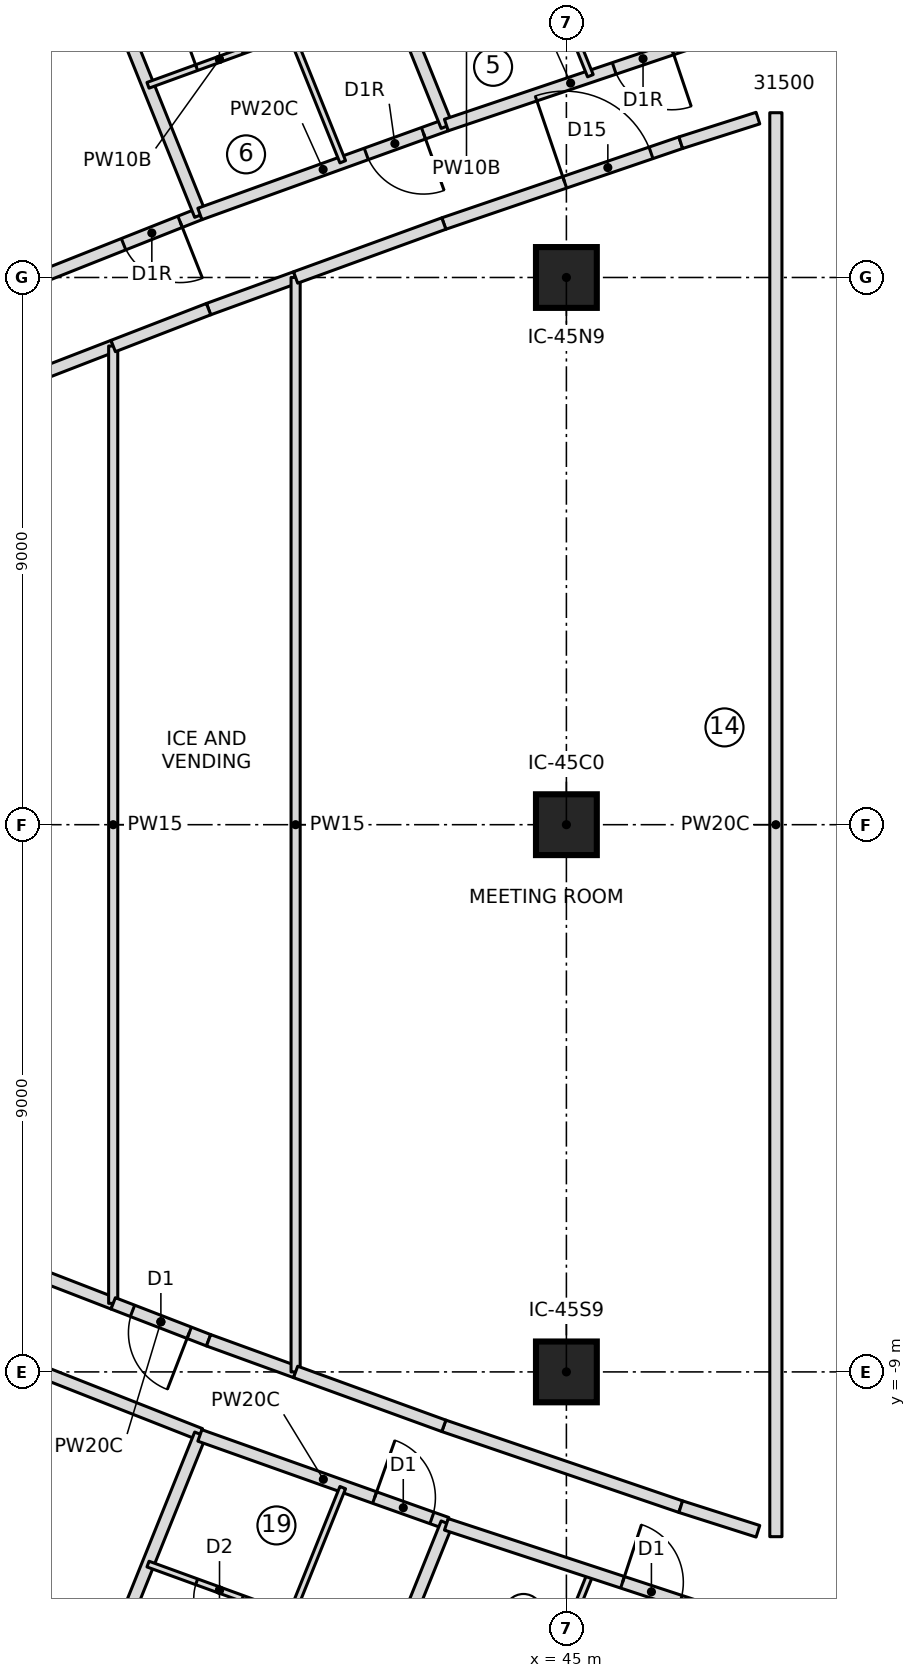
"""IFC4 building model, lengths in metres.
Left out: names, types, materials, properties, quantities, classifications, styles, units other than length and angle.
Written with IfcOpenShell. Run it as: python <this file> out.ifc"""

import sys

from ifc_helpers import new_model, si_unit, direction, frame, frame_2d, origin, origin_2d, place, context, subcontext, project, spatial, rectangle, extrude, element, fill, save


model = new_model("IFC4")
c1 = context("Model", 3, precision=1e-05, world=origin(), true_north=direction((0.0, 1.0)))
c2 = subcontext(c1, "Body", "Model", "MODEL_VIEW")
j1 = project(units=[si_unit("LENGTHUNIT", "METRE"), si_unit("PLANEANGLEUNIT", "RADIAN")], contexts=[c1])
p1 = place(None, origin())
s1 = spatial("IfcSite", under=j1, at=p1, CompositionType="ELEMENT")
p2 = place(p1, origin())
s2 = spatial("IfcBuilding", under=s1, at=p2, CompositionType="ELEMENT")
p3 = place(p2, frame((0.0, 0.0, 179.05)))
s3 = spatial("IfcBuildingStorey", under=s2, at=p3, CompositionType="ELEMENT", Elevation=179.05)
for number, where, z_axis, x_axis in (
    (1, (45.0, -9.0, 0.0), (0.0, 0.0, 1.0), (1.0, 0.0, 0.0)),
    (2, (45.0, 0.0, 0.0), (0.0, 0.0, 1.0), (1.0, 0.0, 0.0)),
    (3, (45.0, 9.0, 0.0), (0.0, 0.0, 1.0), (1.0, 0.0, 0.0)),
):
    element("IfcColumn", number, at=place(p3, frame(where, z_axis=z_axis, x_axis=x_axis)), inside=s3, PredefinedType="COLUMN", context=c2, shape_type="SweptSolid", body=[
        extrude(rectangle(XDim=1.0, YDim=1.0, at=origin_2d()), origin(), (0.0, 0.0, 1.0), 3.55),
    ])
p4 = place(p3, frame((38.972, 10.045, 0.0), z_axis=(0.0, 0.0, 1.0), x_axis=(-0.929554647243, -0.368684360651, 0.0)))
e4 = element("IfcWall", 4, at=p4, inside=s3, PredefinedType="PARTITIONING", context=c2, shape_type="SweptSolid", body=[
    extrude(rectangle(XDim=8.622, YDim=0.2, at=frame_2d((4.311, 0.0))), origin(), (0.0, 0.0, 1.0), 3.25),
])
p5 = place(p4, frame((0.35, 0.0, 0.0)))
e5 = element("IfcOpeningElement", 5, at=p5, cuts=e4, PredefinedType="OPENING", context=c2, shape_type="SweptSolid", body=[
    extrude(rectangle(XDim=1.0, YDim=2.1, at=frame_2d((0.5, 1.05))), frame((0.0, 0.11, 0.0), z_axis=(0.0, -1.0, 0.0), x_axis=(1.0, 0.0, 0.0)), (0.0, 0.0, 1.0), 0.22),
])
p6 = place(p3, frame((38.98, 10.026, 0.0), z_axis=(0.0, 0.0, 1.0), x_axis=(-0.373863662938, 0.927483671843, 0.0)))
e6 = element("IfcWall", 6, at=p6, inside=s3, PredefinedType="PARTITIONING", context=c2, shape_type="SweptSolid", body=[
    extrude(rectangle(XDim=7.604, YDim=0.2, at=frame_2d((3.802, 0.0))), origin(), (0.0, 0.0, 1.0), 3.25),
])
p7 = place(p3, frame((43.026, 11.507, 0.0), z_axis=(0.0, 0.0, 1.0), x_axis=(-0.940653905433, -0.339367397069, 0.0)))
e7 = element("IfcWall", 7, at=p7, inside=s3, PredefinedType="PARTITIONING", context=c2, shape_type="SweptSolid", body=[
    extrude(rectangle(XDim=4.309, YDim=0.2, at=frame_2d((2.155, 0.0))), origin(), (0.0, 0.0, 1.0), 3.25),
])
p8 = place(p7, frame((0.4, 0.0, 0.0)))
e8 = element("IfcOpeningElement", 8, at=p8, cuts=e7, PredefinedType="OPENING", context=c2, shape_type="SweptSolid", body=[
    extrude(rectangle(XDim=1.0, YDim=2.1, at=frame_2d((0.5, 1.05))), frame((0.0, 0.11, 0.0), z_axis=(0.0, -1.0, 0.0), x_axis=(1.0, 0.0, 0.0)), (0.0, 0.0, 1.0), 0.22),
])
p9 = place(p3, frame((38.119, 12.161, 0.0), z_axis=(0.0, 0.0, 1.0), x_axis=(0.939744972593, 0.341876273652, 0.0)))
e9 = element("IfcWall", 9, at=p9, inside=s3, PredefinedType="PARTITIONING", context=c2, shape_type="SweptSolid", body=[
    extrude(rectangle(XDim=2.501, YDim=0.1, at=frame_2d((1.251, 0.0))), origin(), (0.0, 0.0, 1.0), 3.25),
])
p10 = place(p9, frame((0.85, 0.0, 0.0)))
e10 = element("IfcOpeningElement", 10, at=p10, cuts=e9, PredefinedType="OPENING", context=c2, shape_type="SweptSolid", body=[
    extrude(rectangle(XDim=0.8, YDim=2.1, at=frame_2d((0.4, 1.05))), frame((0.0, 0.06, 0.0), z_axis=(0.0, -1.0, 0.0), x_axis=(1.0, 0.0, 0.0)), (0.0, 0.0, 1.0), 0.12),
])
p11 = place(p3, frame((40.47, 13.016, 0.0), z_axis=(0.0, 0.0, 1.0), x_axis=(0.373846436826, -0.927490615409, 0.0)))
e11 = element("IfcWall", 11, at=p11, inside=s3, PredefinedType="PARTITIONING", context=c2, shape_type="SweptSolid", body=[
    extrude(rectangle(XDim=2.279, YDim=0.1, at=frame_2d((1.139, 0.0))), origin(), (0.0, 0.0, 1.0), 3.25),
])
p12 = place(p3, frame((43.033, 11.489, 0.0), z_axis=(0.0, 0.0, 1.0), x_axis=(-0.373877998371, 0.927477893178, 0.0)))
e12 = element("IfcWall", 12, at=p12, inside=s3, PredefinedType="PARTITIONING", context=c2, shape_type="SweptSolid", body=[
    extrude(rectangle(XDim=7.611, YDim=0.2, at=frame_2d((3.806, 0.0))), origin(), (0.0, 0.0, 1.0), 3.25),
])
p13 = place(p3, frame((47.113, 12.886, 0.0), z_axis=(0.0, 0.0, 1.0), x_axis=(-0.947550995841, -0.319604615549, 0.0)))
e13 = element("IfcWall", 13, at=p13, inside=s3, PredefinedType="PARTITIONING", context=c2, shape_type="SweptSolid", body=[
    extrude(rectangle(XDim=4.314, YDim=0.2, at=frame_2d((2.157, 0.0))), origin(), (0.0, 0.0, 1.0), 3.25),
])
p14 = place(p13, frame((0.4, 0.0, 0.0)))
e14 = element("IfcOpeningElement", 14, at=p14, cuts=e13, PredefinedType="OPENING", context=c2, shape_type="SweptSolid", body=[
    extrude(rectangle(XDim=1.0, YDim=2.1, at=frame_2d((0.5, 1.05))), frame((0.0, 0.11, 0.0), z_axis=(0.0, -1.0, 0.0), x_axis=(1.0, 0.0, 0.0)), (0.0, 0.0, 1.0), 0.22),
])
p15 = place(p3, frame((44.542, 14.434, 0.0), z_axis=(0.0, 0.0, 1.0), x_axis=(0.373917841166, -0.927461831052, 0.0)))
e15 = element("IfcWall", 15, at=p15, inside=s3, PredefinedType="PARTITIONING", context=c2, shape_type="SweptSolid", body=[
    extrude(rectangle(XDim=2.281, YDim=0.1, at=frame_2d((1.14, 0.0))), origin(), (0.0, 0.0, 1.0), 3.25),
])
p16 = place(p3, frame((30.958, -6.866, 0.0), z_axis=(0.0, 0.0, 1.0), x_axis=(0.93040517394, -0.366532689274, 0.0)))
e16 = element("IfcWall", 16, at=p16, inside=s3, PredefinedType="PARTITIONING", context=c2, shape_type="SweptSolid", body=[
    extrude(rectangle(XDim=8.622, YDim=0.2, at=frame_2d((4.311, 0.0))), origin(), (0.0, 0.0, 1.0), 3.25),
])
p17 = place(p16, frame((4.25, 0.0, 0.0)))
e17 = element("IfcOpeningElement", 17, at=p17, cuts=e16, PredefinedType="OPENING", context=c2, shape_type="SweptSolid", body=[
    extrude(rectangle(XDim=1.0, YDim=2.1, at=frame_2d((0.5, 1.05))), frame((0.0, 0.11, 0.0), z_axis=(0.0, -1.0, 0.0), x_axis=(1.0, 0.0, 0.0)), (0.0, 0.0, 1.0), 0.22),
])
p18 = place(p3, frame((36.137, -17.079, 0.0), z_axis=(0.0, 0.0, 1.0), x_axis=(0.373863662938, 0.927483671843, 0.0)))
e18 = element("IfcWall", 18, at=p18, inside=s3, PredefinedType="PARTITIONING", context=c2, shape_type="SweptSolid", body=[
    extrude(rectangle(XDim=7.604, YDim=0.2, at=frame_2d((3.802, 0.0))), origin(), (0.0, 0.0, 1.0), 3.25),
])
p19 = place(p3, frame((38.972, -10.045, 0.0), z_axis=(0.0, 0.0, 1.0), x_axis=(0.942220252757, -0.334994022773, 0.0)))
e19 = element("IfcWall", 19, at=p19, inside=s3, PredefinedType="PARTITIONING", context=c2, shape_type="SweptSolid", body=[
    extrude(rectangle(XDim=4.31, YDim=0.2, at=frame_2d((2.155, 0.0))), origin(), (0.0, 0.0, 1.0), 3.25),
])
p20 = place(p19, frame((3.05, 0.0, 0.0)))
e20 = element("IfcOpeningElement", 20, at=p20, cuts=e19, PredefinedType="OPENING", context=c2, shape_type="SweptSolid", body=[
    extrude(rectangle(XDim=1.0, YDim=2.1, at=frame_2d((0.5, 1.05))), frame((0.0, 0.11, 0.0), z_axis=(0.0, -1.0, 0.0), x_axis=(1.0, 0.0, 0.0)), (0.0, 0.0, 1.0), 0.22),
])
p21 = place(p3, frame((41.322, -10.903, 0.0), z_axis=(0.0, 0.0, 1.0), x_axis=(-0.373846436826, -0.927490615409, 0.0)))
e21 = element("IfcWall", 21, at=p21, inside=s3, PredefinedType="PARTITIONING", context=c2, shape_type="SweptSolid", body=[
    extrude(rectangle(XDim=2.279, YDim=0.1, at=frame_2d((1.139, 0.0))), origin(), (0.0, 0.0, 1.0), 3.25),
])
p22 = place(p3, frame((40.47, -13.016, 0.0), z_axis=(0.0, 0.0, 1.0), x_axis=(-0.939744972593, 0.341876273652, 0.0)))
e22 = element("IfcWall", 22, at=p22, inside=s3, PredefinedType="PARTITIONING", context=c2, shape_type="SweptSolid", body=[
    extrude(rectangle(XDim=2.501, YDim=0.1, at=frame_2d((1.251, 0.0))), origin(), (0.0, 0.0, 1.0), 3.25),
])
p23 = place(p22, frame((0.85, 0.0, 0.0)))
e23 = element("IfcOpeningElement", 23, at=p23, cuts=e22, PredefinedType="OPENING", context=c2, shape_type="SweptSolid", body=[
    extrude(rectangle(XDim=0.8, YDim=2.1, at=frame_2d((0.4, 1.05))), frame((0.0, 0.06, 0.0), z_axis=(0.0, -1.0, 0.0), x_axis=(1.0, 0.0, 0.0)), (0.0, 0.0, 1.0), 0.12),
])
p24 = place(p3, frame((40.188, -18.548, 0.0), z_axis=(0.0, 0.0, 1.0), x_axis=(0.373877998371, 0.927477893178, 0.0)))
e24 = element("IfcWall", 24, at=p24, inside=s3, PredefinedType="PARTITIONING", context=c2, shape_type="SweptSolid", body=[
    extrude(rectangle(XDim=7.611, YDim=0.2, at=frame_2d((3.806, 0.0))), origin(), (0.0, 0.0, 1.0), 3.25),
])
p25 = place(p3, frame((45.395, -12.318, 0.0), z_axis=(0.0, 0.0, 1.0), x_axis=(-0.373917841166, -0.927461831052, 0.0)))
e25 = element("IfcWall", 25, at=p25, inside=s3, PredefinedType="PARTITIONING", context=c2, shape_type="SweptSolid", body=[
    extrude(rectangle(XDim=2.281, YDim=0.1, at=frame_2d((1.14, 0.0))), origin(), (0.0, 0.0, 1.0), 3.25),
])
for number, where, z_axis, x_axis in (
    (26, (35.276, 6.994, 0.0), (0.0, 0.0, 1.0), (0.933, 0.361, 0.0)),
    (27, (37.547, -7.873, 0.0), (0.0, 0.0, 1.0), (-0.933, 0.361, 0.0)),
):
    element("IfcWall", number, at=place(p3, frame(where, z_axis=z_axis, x_axis=x_axis)), inside=s3, PredefinedType="PARTITIONING", context=c2, shape_type="SweptSolid", body=[
        extrude(rectangle(XDim=2.435, YDim=0.2, at=frame_2d((1.218, 0.0))), origin(), (0.0, 0.0, 1.0), 3.25),
    ])
p26 = place(p3, frame((37.547, -7.873, 0.0), z_axis=(0.0, 0.0, 1.0), x_axis=(0.0, 1.0, 0.0)))
e28 = element("IfcWall", 28, at=p26, inside=s3, PredefinedType="PARTITIONING", context=c2, shape_type="SweptSolid", body=[
    extrude(rectangle(XDim=15.746, YDim=0.15, at=frame_2d((7.873, 0.0))), origin(), (0.0, 0.0, 1.0), 3.25),
])
p27 = place(p3, frame((39.115, -8.479, 0.0), z_axis=(0.0, 0.0, 1.0), x_axis=(-0.932670528514, 0.360729379511, 0.0)))
e29 = element("IfcWall", 29, at=p27, inside=s3, PredefinedType="PARTITIONING", context=c2, shape_type="SweptSolid", body=[
    extrude(rectangle(XDim=1.682, YDim=0.2, at=frame_2d((0.841, 0.0))), origin(), (0.0, 0.0, 1.0), 3.25),
])
p28 = place(p27, frame((0.341, 0.0, 0.0)))
e30 = element("IfcOpeningElement", 30, at=p28, cuts=e29, PredefinedType="OPENING", context=c2, shape_type="SweptSolid", body=[
    extrude(rectangle(XDim=1.0, YDim=2.1, at=frame_2d((0.5, 1.05))), frame((0.0, 0.11, 0.0), z_axis=(0.0, -1.0, 0.0), x_axis=(1.0, 0.0, 0.0)), (0.0, 0.0, 1.0), 0.22),
])
for number, where, z_axis, x_axis in (
    (31, (39.115, 8.479, 0.0), (0.0, 0.0, 1.0), (0.94, 0.342, 0.0)),
    (32, (40.547, -9.0, 0.0), (0.0, 0.0, 1.0), (-0.94, 0.342, 0.0)),
):
    element("IfcWall", number, at=place(p3, frame(where, z_axis=z_axis, x_axis=x_axis)), inside=s3, PredefinedType="PARTITIONING", context=c2, shape_type="SweptSolid", body=[
        extrude(rectangle(XDim=1.523, YDim=0.2, at=frame_2d((0.762, 0.0))), origin(), (0.0, 0.0, 1.0), 3.25),
    ])
p29 = place(p3, frame((37.547, 7.873, 0.0), z_axis=(0.0, 0.0, 1.0), x_axis=(0.932670528514, 0.360729379511, 0.0)))
e33 = element("IfcWall", 33, at=p29, inside=s3, PredefinedType="PARTITIONING", context=c2, shape_type="SweptSolid", body=[
    extrude(rectangle(XDim=1.682, YDim=0.2, at=frame_2d((0.841, 0.0))), origin(), (0.0, 0.0, 1.0), 3.25),
])
p30 = place(p3, frame((40.547, -9.0, 0.0), z_axis=(0.0, 0.0, 1.0), x_axis=(0.0, 1.0, 0.0)))
e34 = element("IfcWall", 34, at=p30, inside=s3, PredefinedType="PARTITIONING", context=c2, shape_type="SweptSolid", body=[
    extrude(rectangle(XDim=18.0, YDim=0.15, at=frame_2d((9.0, 0.0))), origin(), (0.0, 0.0, 1.0), 3.25),
])
p31 = place(p3, frame((42.984, 9.887, 0.0), z_axis=(0.0, 0.0, 1.0), x_axis=(0.946436071896, 0.322891253852, 0.0)))
e35 = element("IfcWall", 35, at=p31, inside=s3, PredefinedType="PARTITIONING", context=c2, shape_type="SweptSolid", body=[
    extrude(rectangle(XDim=4.117, YDim=0.2, at=frame_2d((2.059, 0.0))), origin(), (0.0, 0.0, 1.0), 3.25),
])
p32 = place(p31, frame((2.1, 0.0, 0.0)))
e36 = element("IfcOpeningElement", 36, at=p32, cuts=e35, PredefinedType="OPENING", context=c2, shape_type="SweptSolid", body=[
    extrude(rectangle(XDim=1.5, YDim=2.1, at=frame_2d((0.75, 1.05))), frame((0.0, 0.11, 0.0), z_axis=(0.0, -1.0, 0.0), x_axis=(1.0, 0.0, 0.0)), (0.0, 0.0, 1.0), 0.22),
])
p33 = place(p3, frame((46.881, -11.217, 0.0), z_axis=(0.0, 0.0, 1.0), x_axis=(-0.946436071896, 0.322891253852, 0.0)))
e37 = element("IfcWall", 37, at=p33, inside=s3, PredefinedType="PARTITIONING", context=c2, shape_type="SweptSolid", body=[
    extrude(rectangle(XDim=4.117, YDim=0.2, at=frame_2d((2.059, 0.0))), origin(), (0.0, 0.0, 1.0), 3.25),
])
for number, where, z_axis, x_axis in (
    (38, (42.984, -9.887, 0.0), (0.0, 0.0, 1.0), (-0.94, 0.342, 0.0)),
    (39, (40.547, 9.0, 0.0), (0.0, 0.0, 1.0), (0.94, 0.342, 0.0)),
):
    element("IfcWall", number, at=place(p3, frame(where, z_axis=z_axis, x_axis=x_axis)), inside=s3, PredefinedType="PARTITIONING", context=c2, shape_type="SweptSolid", body=[
        extrude(rectangle(XDim=2.594, YDim=0.2, at=frame_2d((1.297, 0.0))), origin(), (0.0, 0.0, 1.0), 3.25),
    ])
p34 = place(p3, frame((43.026, -11.507, 0.0), z_axis=(0.0, 0.0, 1.0), x_axis=(0.949951949432, -0.312396052744, 0.0)))
e40 = element("IfcWall", 40, at=p34, inside=s3, PredefinedType="PARTITIONING", context=c2, shape_type="SweptSolid", body=[
    extrude(rectangle(XDim=5.394, YDim=0.2, at=frame_2d((2.697, 0.0))), origin(), (0.0, 0.0, 1.0), 3.25),
])
p35 = place(p34, frame((3.05, 0.0, 0.0)))
e41 = element("IfcOpeningElement", 41, at=p35, cuts=e40, PredefinedType="OPENING", context=c2, shape_type="SweptSolid", body=[
    extrude(rectangle(XDim=1.0, YDim=2.1, at=frame_2d((0.5, 1.05))), frame((0.0, 0.11, 0.0), z_axis=(0.0, -1.0, 0.0), x_axis=(1.0, 0.0, 0.0)), (0.0, 0.0, 1.0), 0.22),
])
for number, where, z_axis, x_axis in (
    (42, (46.881, 11.217, 0.0), (0.0, 0.0, 1.0), (0.953, 0.304, 0.0)),
    (43, (48.15, -11.621, 0.0), (0.0, 0.0, 1.0), (-0.953, 0.304, 0.0)),
):
    element("IfcWall", number, at=place(p3, frame(where, z_axis=z_axis, x_axis=x_axis)), inside=s3, PredefinedType="PARTITIONING", context=c2, shape_type="SweptSolid", body=[
        extrude(rectangle(XDim=1.332, YDim=0.2, at=frame_2d((0.666, 0.0))), origin(), (0.0, 0.0, 1.0), 3.25),
    ])
p36 = place(p3, frame((48.445, 11.71, 0.0), z_axis=(0.0, 0.0, 1.0), x_axis=(0.0, -1.0, 0.0)))
e44 = element("IfcWall", 44, at=p36, inside=s3, PredefinedType="PARTITIONING", context=c2, shape_type="SweptSolid", body=[
    extrude(rectangle(XDim=23.42, YDim=0.2, at=frame_2d((11.71, 0.0))), origin(), (0.0, 0.0, 1.0), 3.25),
])
p37 = place(p5, origin())
e45 = element("IfcDoor", 45, at=p37, inside=s3, OperationType="SINGLE_SWING_RIGHT", PredefinedType="DOOR", context=c2, shape_type="SweptSolid", body=[
    extrude(rectangle(XDim=1.0, YDim=2.1, at=frame_2d((0.5, 1.05))), frame((0.0, 0.025, 0.0), z_axis=(0.0, -1.0, 0.0), x_axis=(1.0, 0.0, 0.0)), (0.0, 0.0, 1.0), 0.05),
])
fill(e5, e45)
p38 = place(p10, origin())
e46 = element("IfcDoor", 46, at=p38, inside=s3, OperationType="SINGLE_SWING_LEFT", PredefinedType="DOOR", context=c2, shape_type="SweptSolid", body=[
    extrude(rectangle(XDim=0.8, YDim=2.1, at=frame_2d((0.4, 1.05))), frame((0.0, 0.025, 0.0), z_axis=(0.0, -1.0, 0.0), x_axis=(1.0, 0.0, 0.0)), (0.0, 0.0, 1.0), 0.05),
])
fill(e10, e46)
p39 = place(p8, origin())
e47 = element("IfcDoor", 47, at=p39, inside=s3, OperationType="SINGLE_SWING_RIGHT", PredefinedType="DOOR", context=c2, shape_type="SweptSolid", body=[
    extrude(rectangle(XDim=1.0, YDim=2.1, at=frame_2d((0.5, 1.05))), frame((0.0, 0.025, 0.0), z_axis=(0.0, -1.0, 0.0), x_axis=(1.0, 0.0, 0.0)), (0.0, 0.0, 1.0), 0.05),
])
fill(e8, e47)
p40 = place(p14, origin())
e48 = element("IfcDoor", 48, at=p40, inside=s3, OperationType="SINGLE_SWING_RIGHT", PredefinedType="DOOR", context=c2, shape_type="SweptSolid", body=[
    extrude(rectangle(XDim=1.0, YDim=2.1, at=frame_2d((0.5, 1.05))), frame((0.0, 0.025, 0.0), z_axis=(0.0, -1.0, 0.0), x_axis=(1.0, 0.0, 0.0)), (0.0, 0.0, 1.0), 0.05),
])
fill(e14, e48)
p41 = place(p23, origin())
e49 = element("IfcDoor", 49, at=p41, inside=s3, OperationType="SINGLE_SWING_LEFT", PredefinedType="DOOR", context=c2, shape_type="SweptSolid", body=[
    extrude(rectangle(XDim=0.8, YDim=2.1, at=frame_2d((0.4, 1.05))), frame((0.0, 0.025, 0.0), z_axis=(0.0, -1.0, 0.0), x_axis=(1.0, 0.0, 0.0)), (0.0, 0.0, 1.0), 0.05),
])
fill(e23, e49)
p42 = place(p20, origin())
e50 = element("IfcDoor", 50, at=p42, inside=s3, OperationType="SINGLE_SWING_LEFT", PredefinedType="DOOR", context=c2, shape_type="SweptSolid", body=[
    extrude(rectangle(XDim=1.0, YDim=2.1, at=frame_2d((0.5, 1.05))), frame((0.0, 0.025, 0.0), z_axis=(0.0, -1.0, 0.0), x_axis=(1.0, 0.0, 0.0)), (0.0, 0.0, 1.0), 0.05),
])
fill(e20, e50)
p43 = place(p35, origin())
e51 = element("IfcDoor", 51, at=p43, inside=s3, OperationType="SINGLE_SWING_LEFT", PredefinedType="DOOR", context=c2, shape_type="SweptSolid", body=[
    extrude(rectangle(XDim=1.0, YDim=2.1, at=frame_2d((0.5, 1.05))), frame((0.0, 0.025, 0.0), z_axis=(0.0, -1.0, 0.0), x_axis=(1.0, 0.0, 0.0)), (0.0, 0.0, 1.0), 0.05),
])
fill(e41, e51)
p44 = place(p28, origin())
e52 = element("IfcDoor", 52, at=p44, inside=s3, OperationType="SINGLE_SWING_LEFT", PredefinedType="DOOR", context=c2, shape_type="SweptSolid", body=[
    extrude(rectangle(XDim=1.0, YDim=2.1, at=frame_2d((0.5, 1.05))), frame((0.0, 0.025, 0.0), z_axis=(0.0, -1.0, 0.0), x_axis=(1.0, 0.0, 0.0)), (0.0, 0.0, 1.0), 0.05),
])
fill(e30, e52)
p45 = place(p32, origin())
e53 = element("IfcDoor", 53, at=p45, inside=s3, OperationType="DOUBLE_DOOR_SINGLE_SWING", PredefinedType="DOOR", context=c2, shape_type="SweptSolid", body=[
    extrude(rectangle(XDim=1.5, YDim=2.1, at=frame_2d((0.75, 1.05))), frame((0.0, 0.025, 0.0), z_axis=(0.0, -1.0, 0.0), x_axis=(1.0, 0.0, 0.0)), (0.0, 0.0, 1.0), 0.05),
])
fill(e36, e53)
save(model, sys.argv[1])
